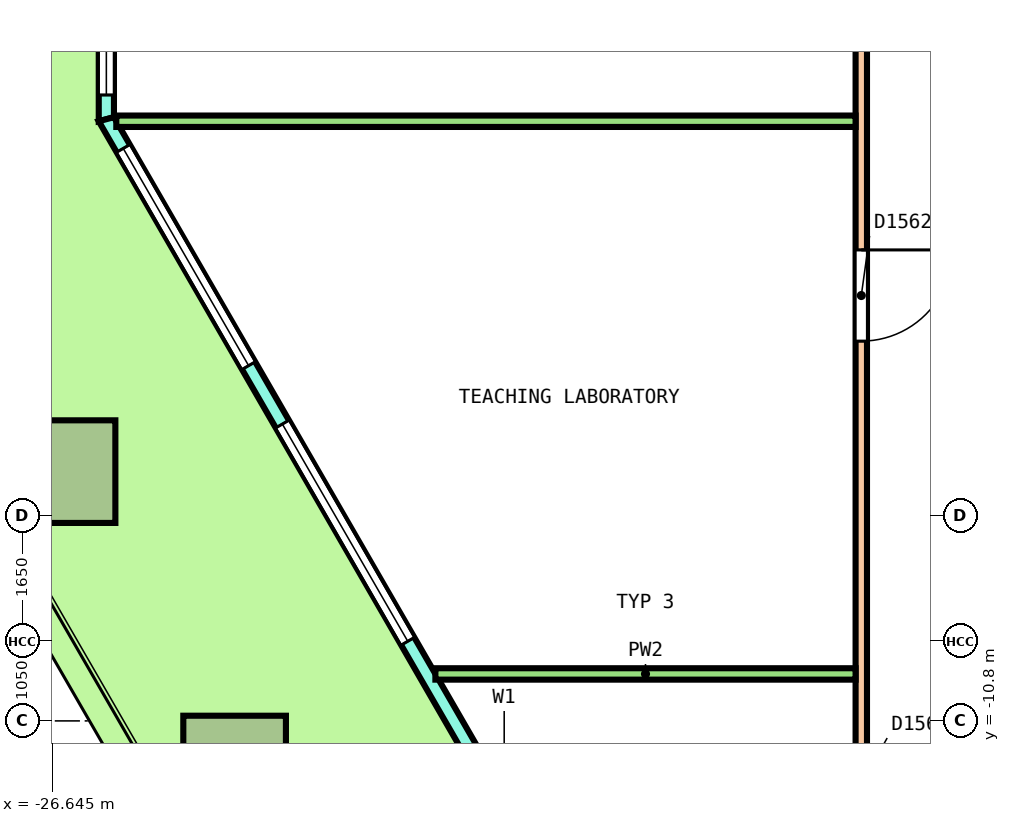
"""IFC4 building model, lengths in metres.
Left out: names, types, materials, properties, quantities, classifications, styles, units other than length and angle.
Written with IfcOpenShell. Run it as: python <this file> out.ifc"""

import sys

from ifc_helpers import new_model, si_unit, direction, frame, frame_2d, origin, origin_2d, place, context, subcontext, project, spatial, polyline, rectangle, outline, extrude, element, fill, save


model = new_model("IFC4")
c1 = context("Model", 3, precision=1e-05, world=origin(), true_north=direction((0.0, 1.0)))
c2 = subcontext(c1, "Body", "Model", "MODEL_VIEW")
j1 = project(units=[si_unit("LENGTHUNIT", "METRE"), si_unit("PLANEANGLEUNIT", "RADIAN")], contexts=[c1])
p1 = place(None, origin())
s1 = spatial("IfcSite", under=j1, at=p1, CompositionType="ELEMENT")
p2 = place(p1, origin())
s2 = spatial("IfcBuilding", under=s1, at=p2, CompositionType="ELEMENT")
p3 = place(p2, frame((0.0, 0.0, 98.4)))
s3 = spatial("IfcBuildingStorey", under=s2, at=p3, CompositionType="ELEMENT", Elevation=98.4)
p4 = place(p3, frame((-26.488, -7.521, 0.0), z_axis=(-0.010908253887, 0.018863444567, 0.99976256204), x_axis=(0.500638377412, -0.865382225109, 0.021790354016)))
e1 = element("IfcColumn", 1, at=p4, inside=s3, PredefinedType="COLUMN", context=c2, shape_type="SweptSolid", body=[
    extrude(rectangle(XDim=1.35, YDim=1.35, at=origin_2d()), origin(), (0.0, 0.0, 1.0), 4.051),
])
p5 = place(p3, frame((-24.245, -11.407, 0.0), z_axis=(-0.003677036938, 0.006329325876, 0.999973209158), x_axis=(0.502147149997, -0.864751212075, 0.007319901948)))
e2 = element("IfcColumn", 2, at=p5, inside=s3, PredefinedType="COLUMN", context=c2, shape_type="SweptSolid", body=[
    extrude(rectangle(XDim=1.35, YDim=1.35, at=origin_2d()), origin(), (0.0, 0.0, 1.0), 4.05),
])
p6 = place(p3, frame((-25.932, 3.99, 0.0), z_axis=(0.0, 0.0, 1.0), x_axis=(0.0, -1.0, 0.0)))
e3 = element("IfcWall", 3, at=p6, inside=s3, PredefinedType="SOLIDWALL", context=c2, shape_type="SweptSolid", body=[
    extrude(outline(polyline([(-0.027, -0.1), (1.128, -0.1), (2.283, -0.1), (3.438, -0.1), (4.592, -0.1), (5.747, -0.1), (6.902, -0.1), (6.848, 0.1), (5.711, 0.1), (4.574, 0.1), (3.438, 0.1), (2.301, 0.1), (1.164, 0.1), (0.027, 0.1), (-0.027, -0.1)])), origin(), (0.0, 0.0, 1.0), 4.1),
])
p7 = place(p6, frame((0.319, 0.0, 0.1)))
e4 = element("IfcOpeningElement", 4, at=p7, cuts=e3, PredefinedType="OPENING", context=c2, shape_type="SweptSolid", body=[
    extrude(rectangle(XDim=2.8, YDim=2.9, at=frame_2d((1.4, 1.45))), frame((0.0, 0.11, 0.0), z_axis=(0.0, -1.0, 0.0), x_axis=(1.0, 0.0, 0.0)), (0.0, 0.0, 1.0), 0.22),
])
p8 = place(p6, frame((3.756, 0.0, 0.1)))
e5 = element("IfcOpeningElement", 5, at=p8, cuts=e3, PredefinedType="OPENING", context=c2, shape_type="SweptSolid", body=[
    extrude(rectangle(XDim=2.8, YDim=2.9, at=frame_2d((1.4, 1.45))), frame((0.0, 0.11, 0.0), z_axis=(0.0, -1.0, 0.0), x_axis=(1.0, 0.0, 0.0)), (0.0, 0.0, 1.0), 0.22),
])
p9 = place(p3, frame((-25.932, -2.884, 0.0), z_axis=(0.0, 0.0, 1.0), x_axis=(0.499999366442, -0.866025769569, 0.0)))
e6 = element("IfcWall", 6, at=p9, inside=s3, PredefinedType="SOLIDWALL", context=c2, shape_type="SweptSolid", body=[
    extrude(outline(polyline([(-0.027, -0.1), (1.023, -0.1), (2.072, -0.1), (3.122, -0.1), (4.171, -0.1), (5.221, -0.1), (6.27, -0.1), (7.32, -0.1), (8.369, -0.1), (9.419, -0.1), (10.468, -0.1), (11.518, -0.1), (12.567, -0.1), (13.617, -0.1), (14.666, -0.1), (15.716, -0.1), (16.765, -0.1), (17.815, -0.1), (18.864, -0.1), (19.914, -0.1), (20.963, -0.1), (20.91, 0.1), (19.865, 0.1), (18.821, 0.1), (17.777, 0.1), (16.733, 0.1), (15.689, 0.1), (14.645, 0.1), (13.601, 0.1), (12.557, 0.1), (11.512, 0.1), (10.468, 0.1), (9.424, 0.1), (8.38, 0.1), (7.336, 0.1), (6.292, 0.1), (5.248, 0.1), (4.203, 0.1), (3.159, 0.1), (2.115, 0.1), (1.071, 0.1), (0.027, 0.1), (-0.027, -0.1)])), origin(), (0.0, 0.0, 1.0), 4.1),
])
p10 = place(p9, frame((0.444, 0.0, 0.1)))
e7 = element("IfcOpeningElement", 7, at=p10, cuts=e6, PredefinedType="OPENING", context=c2, shape_type="SweptSolid", body=[
    extrude(rectangle(XDim=3.3, YDim=2.9, at=frame_2d((1.65, 1.45))), frame((0.0, 0.11, 0.0), z_axis=(0.0, -1.0, 0.0), x_axis=(1.0, 0.0, 0.0)), (0.0, 0.0, 1.0), 0.22),
])
p11 = place(p9, frame((4.631, 0.0, 0.1)))
e8 = element("IfcOpeningElement", 8, at=p11, cuts=e6, PredefinedType="OPENING", context=c2, shape_type="SweptSolid", body=[
    extrude(rectangle(XDim=3.3, YDim=2.9, at=frame_2d((1.65, 1.45))), frame((0.0, 0.11, 0.0), z_axis=(0.0, -1.0, 0.0), x_axis=(1.0, 0.0, 0.0)), (0.0, 0.0, 1.0), 0.22),
])
p12 = place(p9, frame((9.568, 0.0, 0.0)))
e9 = element("IfcOpeningElement", 9, at=p12, cuts=e6, PredefinedType="OPENING", context=c2, shape_type="SweptSolid", body=[
    extrude(rectangle(XDim=1.8, YDim=2.4, at=frame_2d((0.9, 1.2))), frame((0.0, 0.11, 0.0), z_axis=(0.0, -1.0, 0.0), x_axis=(1.0, 0.0, 0.0)), (0.0, 0.0, 1.0), 0.22),
])
p13 = place(p9, frame((9.568, 0.0, 2.55)))
e10 = element("IfcOpeningElement", 10, at=p13, cuts=e6, PredefinedType="OPENING", context=c2, shape_type="SweptSolid", body=[
    extrude(rectangle(XDim=1.8, YDim=0.45, at=frame_2d((0.9, 0.225))), frame((0.0, 0.11, 0.0), z_axis=(0.0, -1.0, 0.0), x_axis=(1.0, 0.0, 0.0)), (0.0, 0.0, 1.0), 0.22),
])
p14 = place(p9, frame((13.006, 0.0, 0.1)))
e11 = element("IfcOpeningElement", 11, at=p14, cuts=e6, PredefinedType="OPENING", context=c2, shape_type="SweptSolid", body=[
    extrude(rectangle(XDim=3.3, YDim=2.9, at=frame_2d((1.65, 1.45))), frame((0.0, 0.11, 0.0), z_axis=(0.0, -1.0, 0.0), x_axis=(1.0, 0.0, 0.0)), (0.0, 0.0, 1.0), 0.22),
])
p15 = place(p9, frame((17.193, 0.0, 0.1)))
e12 = element("IfcOpeningElement", 12, at=p15, cuts=e6, PredefinedType="OPENING", context=c2, shape_type="SweptSolid", body=[
    extrude(rectangle(XDim=3.3, YDim=2.9, at=frame_2d((1.65, 1.45))), frame((0.0, 0.11, 0.0), z_axis=(0.0, -1.0, 0.0), x_axis=(1.0, 0.0, 0.0)), (0.0, 0.0, 1.0), 0.22),
])
p16 = place(p3, frame((-16.0, -13.525, 0.0), z_axis=(0.0, 0.0, 1.0), x_axis=(0.0, 1.0, 0.0)))
e13 = element("IfcWall", 13, at=p16, inside=s3, PredefinedType="PARTITIONING", context=c2, shape_type="SweptSolid", body=[
    extrude(rectangle(XDim=27.075, YDim=0.15, at=frame_2d((13.538, 0.0))), origin(), (0.0, 0.0, 1.0), 3.05),
])
p17 = place(p16, frame((24.819, 0.0, 0.0)))
e14 = element("IfcOpeningElement", 14, at=p17, cuts=e13, PredefinedType="OPENING", context=c2, shape_type="SweptSolid", body=[
    extrude(rectangle(XDim=1.0, YDim=2.1, at=frame_2d((0.5, 1.05))), frame((0.0, 0.085, 0.0), z_axis=(0.0, -1.0, 0.0), x_axis=(1.0, 0.0, 0.0)), (0.0, 0.0, 1.0), 0.17),
])
p18 = place(p16, frame((19.54, 0.0, 0.0)))
e15 = element("IfcOpeningElement", 15, at=p18, cuts=e13, PredefinedType="OPENING", context=c2, shape_type="SweptSolid", body=[
    extrude(rectangle(XDim=1.2, YDim=2.1, at=frame_2d((0.6, 1.05))), frame((0.0, 0.085, 0.0), z_axis=(0.0, -1.0, 0.0), x_axis=(1.0, 0.0, 0.0)), (0.0, 0.0, 1.0), 0.17),
])
p19 = place(p16, frame((14.735, 0.0, 0.0)))
e16 = element("IfcOpeningElement", 16, at=p19, cuts=e13, PredefinedType="OPENING", context=c2, shape_type="SweptSolid", body=[
    extrude(rectangle(XDim=1.2, YDim=2.1, at=frame_2d((0.6, 1.05))), frame((0.0, 0.085, 0.0), z_axis=(0.0, -1.0, 0.0), x_axis=(1.0, 0.0, 0.0)), (0.0, 0.0, 1.0), 0.17),
])
p20 = place(p16, frame((7.721, 0.0, 0.0)))
e17 = element("IfcOpeningElement", 17, at=p20, cuts=e13, PredefinedType="OPENING", context=c2, shape_type="SweptSolid", body=[
    extrude(rectangle(XDim=1.2, YDim=2.1, at=frame_2d((0.6, 1.05))), frame((0.0, 0.085, 0.0), z_axis=(0.0, -1.0, 0.0), x_axis=(1.0, 0.0, 0.0)), (0.0, 0.0, 1.0), 0.17),
])
p21 = place(p16, frame((1.392, 0.0, 0.0)))
e18 = element("IfcOpeningElement", 18, at=p21, cuts=e13, PredefinedType="OPENING", context=c2, shape_type="SweptSolid", body=[
    extrude(rectangle(XDim=1.0, YDim=2.1, at=frame_2d((0.5, 1.05))), frame((0.0, 0.085, 0.0), z_axis=(0.0, -1.0, 0.0), x_axis=(1.0, 0.0, 0.0)), (0.0, 0.0, 1.0), 0.17),
])
p22 = place(p3, frame((-25.801, -2.911, 0.0), z_axis=(0.0, 0.0, 1.0), x_axis=(1.0, 0.0, 0.0)))
e19 = element("IfcWall", 19, at=p22, inside=s3, PredefinedType="PARTITIONING", context=c2, shape_type="SweptSolid", body=[
    extrude(rectangle(XDim=9.726, YDim=0.15, at=frame_2d((4.863, 0.0))), origin(), (0.0, 0.0, 1.0), 3.05),
])
p23 = place(p3, frame((-21.603, -10.182, 0.0), z_axis=(0.0, 0.0, 1.0), x_axis=(1.0, 0.0, 0.0)))
e20 = element("IfcWall", 20, at=p23, inside=s3, PredefinedType="PARTITIONING", context=c2, shape_type="SweptSolid", body=[
    extrude(rectangle(XDim=5.528, YDim=0.15, at=frame_2d((2.764, 0.0))), origin(), (0.0, 0.0, 1.0), 3.05),
])
p24 = place(p8, origin())
e21 = element("IfcWindow", 21, at=p24, inside=s3, PartitioningType="SINGLE_PANEL", PredefinedType="WINDOW", context=c2, shape_type="SweptSolid", body=[
    extrude(rectangle(XDim=2.8, YDim=2.9, at=frame_2d((1.4, 1.45))), frame((0.0, 0.03, 0.0), z_axis=(0.0, -1.0, 0.0), x_axis=(1.0, 0.0, 0.0)), (0.0, 0.0, 1.0), 0.06),
])
fill(e5, e21)
p25 = place(p10, origin())
e22 = element("IfcWindow", 22, at=p25, inside=s3, PartitioningType="SINGLE_PANEL", PredefinedType="WINDOW", context=c2, shape_type="SweptSolid", body=[
    extrude(rectangle(XDim=3.3, YDim=2.9, at=frame_2d((1.65, 1.45))), frame((0.0, 0.03, 0.0), z_axis=(0.0, -1.0, 0.0), x_axis=(1.0, 0.0, 0.0)), (0.0, 0.0, 1.0), 0.06),
])
fill(e7, e22)
p26 = place(p11, origin())
e23 = element("IfcWindow", 23, at=p26, inside=s3, PartitioningType="SINGLE_PANEL", PredefinedType="WINDOW", context=c2, shape_type="SweptSolid", body=[
    extrude(rectangle(XDim=3.3, YDim=2.9, at=frame_2d((1.65, 1.45))), frame((0.0, 0.03, 0.0), z_axis=(0.0, -1.0, 0.0), x_axis=(1.0, 0.0, 0.0)), (0.0, 0.0, 1.0), 0.06),
])
fill(e8, e23)
p27 = place(p20, origin())
e24 = element("IfcDoor", 24, at=p27, inside=s3, OperationType="DOUBLE_DOOR_SINGLE_SWING", PredefinedType="DOOR", context=c2, shape_type="SweptSolid", body=[
    extrude(rectangle(XDim=1.2, YDim=2.1, at=frame_2d((0.6, 1.05))), frame((0.0, 0.025, 0.0), z_axis=(0.0, -1.0, 0.0), x_axis=(1.0, 0.0, 0.0)), (0.0, 0.0, 1.0), 0.05),
])
fill(e17, e24)
save(model, sys.argv[1])
